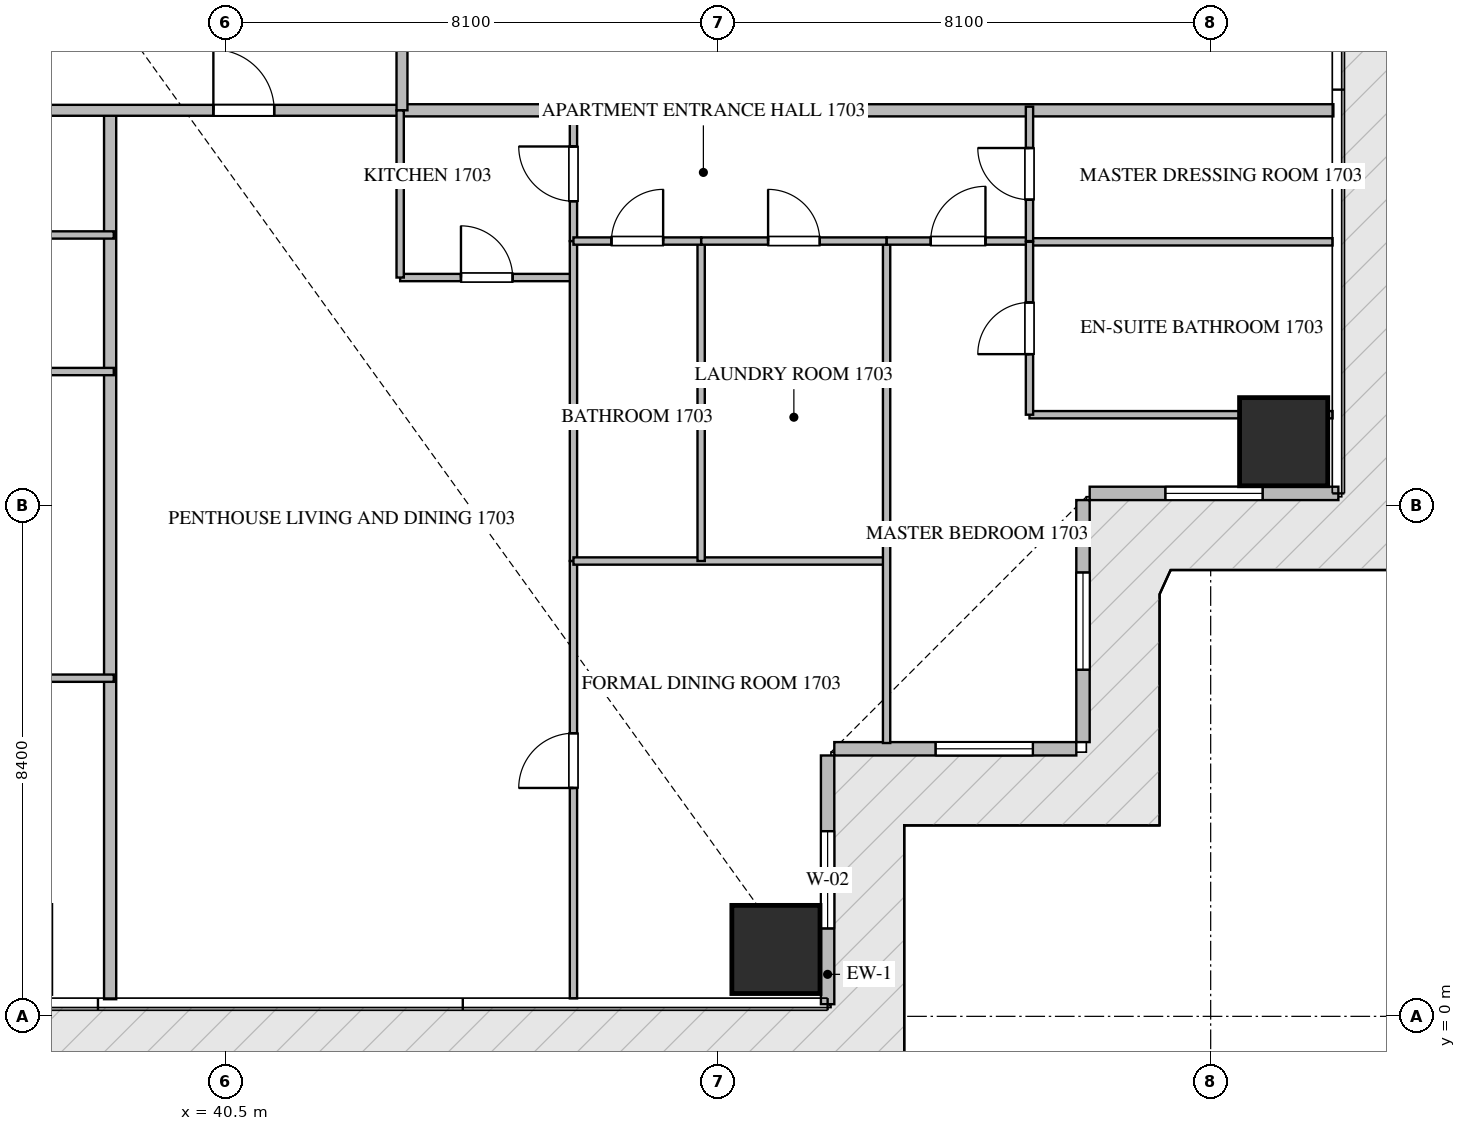
"""IFC4 building model, lengths in metres.
Left out: names, types, materials, properties, quantities, classifications, styles, units other than length and angle.
Written with IfcOpenShell. Run it as: python <this file> out.ifc"""

import sys

from ifc_helpers import new_model, si_unit, direction, frame, frame_2d, origin, origin_2d, place, context, subcontext, project, spatial, rectangle, extrude, source, transform, mapped, element, fill, save


model = new_model("IFC4")
c1 = context("Model", 3, precision=1e-05, world=origin(), true_north=direction((0.0, 1.0)))
c2 = subcontext(c1, "Body", "Model", "MODEL_VIEW")
j1 = project(units=[si_unit("LENGTHUNIT", "METRE"), si_unit("PLANEANGLEUNIT", "RADIAN")], contexts=[c1])
p1 = place(None, origin())
s1 = spatial("IfcSite", under=j1, at=p1, CompositionType="ELEMENT")
p2 = place(p1, origin())
s2 = spatial("IfcBuilding", under=s1, at=p2, CompositionType="ELEMENT")
p3 = place(p2, frame((0.0, 0.0, 71.7)))
s3 = spatial("IfcBuildingStorey", under=s2, at=p3, CompositionType="ELEMENT", Elevation=71.7)
m1 = source(origin(), c2, "Body", "SweptSolid", [
    extrude(rectangle(XDim=1.45, YDim=1.45, at=origin_2d()), origin(), (0.0, 0.0, 1.0), 3.75),
])
for number, where, z_axis, x_axis in (
    (1, (49.55, 1.1, -0.26), (0.0, 0.0, 1.0), (1.0, 0.0, 0.0)),
    (2, (57.9, 9.45, -0.26), (0.0, 0.0, 1.0), (1.0, 0.0, 0.0)),
):
    element("IfcColumn", number, at=place(p3, frame(where, z_axis=z_axis, x_axis=x_axis)), inside=s3, PredefinedType="COLUMN", context=c2, shape_type="MappedRepresentation", body=[
        mapped(m1, transform((0.0, 0.0, 0.0), scale=1.0)),
    ])
p4 = place(p3, frame((50.4, 0.2, 0.0), z_axis=(0.0, 0.0, 1.0), x_axis=(0.0, 1.0, 0.0)))
e3 = element("IfcWall", 3, at=p4, inside=s3, PredefinedType="ELEMENTEDWALL", context=c2, shape_type="SweptSolid", body=[
    extrude(rectangle(XDim=4.09, YDim=0.22, at=frame_2d((2.045, 0.0))), origin(), (0.0, 0.0, 1.0), 3.475),
])
p5 = place(p4, frame((1.245, 0.0, 0.65)))
e4 = element("IfcOpeningElement", 4, at=p5, cuts=e3, PredefinedType="OPENING", context=c2, shape_type="SweptSolid", body=[
    extrude(rectangle(XDim=1.6, YDim=2.1, at=frame_2d((0.8, 1.05))), frame((0.0, 0.12, 0.0), z_axis=(0.0, -1.0, 0.0), x_axis=(1.0, 0.0, 0.0)), (0.0, 0.0, 1.0), 0.24),
])
p6 = place(p3, frame((50.51, 4.4, 0.0), z_axis=(0.0, 0.0, 1.0), x_axis=(1.0, 0.0, 0.0)))
e5 = element("IfcWall", 5, at=p6, inside=s3, PredefinedType="ELEMENTEDWALL", context=c2, shape_type="SweptSolid", body=[
    extrude(rectangle(XDim=3.98, YDim=0.22, at=frame_2d((1.99, 0.0))), origin(), (0.0, 0.0, 1.0), 3.475),
])
p7 = place(p6, frame((1.666, 0.0, 0.65)))
e6 = element("IfcOpeningElement", 6, at=p7, cuts=e5, PredefinedType="OPENING", context=c2, shape_type="SweptSolid", body=[
    extrude(rectangle(XDim=1.6, YDim=2.1, at=frame_2d((0.8, 1.05))), frame((0.0, 0.12, 0.0), z_axis=(0.0, -1.0, 0.0), x_axis=(1.0, 0.0, 0.0)), (0.0, 0.0, 1.0), 0.24),
])
p8 = place(p3, frame((54.6, 4.51, 0.0), z_axis=(0.0, 0.0, 1.0), x_axis=(0.0, 1.0, 0.0)))
e7 = element("IfcWall", 7, at=p8, inside=s3, PredefinedType="ELEMENTEDWALL", context=c2, shape_type="SweptSolid", body=[
    extrude(rectangle(XDim=3.98, YDim=0.22, at=frame_2d((1.99, 0.0))), origin(), (0.0, 0.0, 1.0), 3.475),
])
p9 = place(p8, frame((1.19, 0.0, 0.65)))
e8 = element("IfcOpeningElement", 8, at=p9, cuts=e7, PredefinedType="OPENING", context=c2, shape_type="SweptSolid", body=[
    extrude(rectangle(XDim=1.6, YDim=2.1, at=frame_2d((0.8, 1.05))), frame((0.0, 0.12, 0.0), z_axis=(0.0, -1.0, 0.0), x_axis=(1.0, 0.0, 0.0)), (0.0, 0.0, 1.0), 0.24),
])
p10 = place(p3, frame((54.71, 8.6, 0.0), z_axis=(0.0, 0.0, 1.0), x_axis=(1.0, 0.0, 0.0)))
e9 = element("IfcWall", 9, at=p10, inside=s3, PredefinedType="ELEMENTEDWALL", context=c2, shape_type="SweptSolid", body=[
    extrude(rectangle(XDim=4.09, YDim=0.22, at=frame_2d((2.045, 0.0))), origin(), (0.0, 0.0, 1.0), 3.475),
])
p11 = place(p10, frame((1.245, 0.0, 0.65)))
e10 = element("IfcOpeningElement", 10, at=p11, cuts=e9, PredefinedType="OPENING", context=c2, shape_type="SweptSolid", body=[
    extrude(rectangle(XDim=1.6, YDim=2.1, at=frame_2d((0.8, 1.05))), frame((0.0, 0.12, 0.0), z_axis=(0.0, -1.0, 0.0), x_axis=(1.0, 0.0, 0.0)), (0.0, 0.0, 1.0), 0.24),
])
p12 = place(p3, frame((38.6, 0.282, 0.0), z_axis=(0.0, 0.0, 1.0), x_axis=(0.0, 1.0, 0.0)))
e11 = element("IfcWall", 11, at=p12, inside=s3, PredefinedType="PARTITIONING", context=c2, shape_type="SweptSolid", body=[
    extrude(rectangle(XDim=14.618, YDim=0.2, at=frame_2d((7.309, 0.0))), origin(), (0.0, 0.0, 1.0), 3.49),
])
p13 = place(p3, frame((43.4, 14.9, 0.0), z_axis=(0.0, 0.0, 1.0), x_axis=(1.0, 0.0, 0.0)))
e12 = element("IfcWall", 12, at=p13, inside=s3, PredefinedType="PARTITIONING", context=c2, shape_type="SweptSolid", body=[
    extrude(rectangle(XDim=15.318, YDim=0.2, at=frame_2d((7.659, 0.0))), origin(), (0.0, 0.0, 1.0), 3.49),
])
p14 = place(p3, frame((21.402, 14.9, 0.0), z_axis=(0.0, 0.0, 1.0), x_axis=(1.0, 0.0, 0.0)))
e13 = element("IfcWall", 13, at=p14, inside=s3, PredefinedType="PARTITIONING", context=c2, shape_type="SweptSolid", body=[
    extrude(rectangle(XDim=21.996, YDim=0.18, at=frame_2d((10.998, 0.0))), origin(), (0.0, 0.0, 1.0), 3.49),
])
p15 = place(p14, frame((2.1, 0.0, 0.0)))
e14 = element("IfcOpeningElement", 14, at=p15, cuts=e13, PredefinedType="OPENING", context=c2, shape_type="SweptSolid", body=[
    extrude(rectangle(XDim=1.0, YDim=2.15, at=frame_2d((0.5, 1.075))), frame((0.0, 0.1, 0.0), z_axis=(0.0, -1.0, 0.0), x_axis=(1.0, 0.0, 0.0)), (0.0, 0.0, 1.0), 0.2),
])
p16 = place(p14, frame((6.173, 0.0, 0.0)))
e15 = element("IfcOpeningElement", 15, at=p16, cuts=e13, PredefinedType="OPENING", context=c2, shape_type="SweptSolid", body=[
    extrude(rectangle(XDim=1.0, YDim=2.15, at=frame_2d((0.5, 1.075))), frame((0.0, 0.1, 0.0), z_axis=(0.0, -1.0, 0.0), x_axis=(1.0, 0.0, 0.0)), (0.0, 0.0, 1.0), 0.2),
])
p17 = place(p14, frame((18.896, 0.0, 0.0)))
e16 = element("IfcOpeningElement", 16, at=p17, cuts=e13, PredefinedType="OPENING", context=c2, shape_type="SweptSolid", body=[
    extrude(rectangle(XDim=1.0, YDim=2.15, at=frame_2d((0.5, 1.075))), frame((0.0, 0.1, 0.0), z_axis=(0.0, -1.0, 0.0), x_axis=(1.0, 0.0, 0.0)), (0.0, 0.0, 1.0), 0.2),
])
p18 = place(p3, frame((43.4, 14.9, 0.0), z_axis=(0.0, 0.0, 1.0), x_axis=(0.0, 1.0, 0.0)))
e17 = element("IfcWall", 17, at=p18, inside=s3, PredefinedType="PARTITIONING", context=c2, shape_type="SweptSolid", body=[
    extrude(rectangle(XDim=20.6, YDim=0.18, at=frame_2d((10.3, 0.0))), origin(), (0.0, 0.0, 1.0), 3.49),
])
p19 = place(p18, frame((1.96, 0.0, 0.0)))
e18 = element("IfcOpeningElement", 18, at=p19, cuts=e17, PredefinedType="OPENING", context=c2, shape_type="SweptSolid", body=[
    extrude(rectangle(XDim=1.0, YDim=2.15, at=frame_2d((0.5, 1.075))), frame((0.0, 0.1, 0.0), z_axis=(0.0, -1.0, 0.0), x_axis=(1.0, 0.0, 0.0)), (0.0, 0.0, 1.0), 0.2),
])
for number, where, z_axis, x_axis in (
    (19, (30.54, 5.561, 0.0), (0.0, 0.0, 1.0), (1.0, 0.0, 0.0)),
    (20, (30.54, 10.604, 0.0), (0.0, 0.0, 1.0), (1.0, 0.0, 0.0)),
    (21, (30.54, 12.85, 0.0), (0.0, 0.0, 1.0), (1.0, 0.0, 0.0)),
):
    element("IfcWall", number, at=place(p3, frame(where, z_axis=z_axis, x_axis=x_axis)), inside=s3, PredefinedType="PARTITIONING", context=c2, shape_type="SweptSolid", body=[
        extrude(rectangle(XDim=8.12, YDim=0.12, at=frame_2d((4.06, 0.0))), origin(), (0.0, 0.0, 1.0), 3.49),
    ])
p20 = place(p3, frame((43.37, 12.15, 0.0), z_axis=(0.0, 0.0, 1.0), x_axis=(1.0, 0.0, 0.0)))
e22 = element("IfcWall", 22, at=p20, inside=s3, PredefinedType="PARTITIONING", context=c2, shape_type="SweptSolid", body=[
    extrude(rectangle(XDim=2.85, YDim=0.12, at=frame_2d((1.425, 0.0))), origin(), (0.0, 0.0, 1.0), 3.49),
])
p21 = place(p20, frame((1.0, 0.0, 0.0)))
e23 = element("IfcOpeningElement", 23, at=p21, cuts=e22, PredefinedType="OPENING", context=c2, shape_type="SweptSolid", body=[
    extrude(rectangle(XDim=0.85, YDim=2.1, at=frame_2d((0.425, 1.05))), frame((0.0, 0.07, 0.0), z_axis=(0.0, -1.0, 0.0), x_axis=(1.0, 0.0, 0.0)), (0.0, 0.0, 1.0), 0.14),
])
p22 = place(p3, frame((43.37, 12.15, 0.0), z_axis=(0.0, 0.0, 1.0), x_axis=(0.0, 1.0, 0.0)))
e24 = element("IfcWall", 24, at=p22, inside=s3, PredefinedType="PARTITIONING", context=c2, shape_type="SweptSolid", body=[
    extrude(rectangle(XDim=2.748, YDim=0.12, at=frame_2d((1.374, 0.0))), origin(), (0.0, 0.0, 1.0), 3.49),
])
p23 = place(p3, frame((46.22, 12.75, 0.0), z_axis=(0.0, 0.0, 1.0), x_axis=(0.0, 1.0, 0.0)))
e25 = element("IfcWall", 25, at=p23, inside=s3, PredefinedType="PARTITIONING", context=c2, shape_type="SweptSolid", body=[
    extrude(rectangle(XDim=2.21, YDim=0.12, at=frame_2d((1.105, 0.0))), origin(), (0.0, 0.0, 1.0), 3.49),
])
p24 = place(p23, frame((0.655, 0.0, 0.0)))
e26 = element("IfcOpeningElement", 26, at=p24, cuts=e25, PredefinedType="OPENING", context=c2, shape_type="SweptSolid", body=[
    extrude(rectangle(XDim=0.9, YDim=2.1, at=frame_2d((0.45, 1.05))), frame((0.0, 0.07, 0.0), z_axis=(0.0, -1.0, 0.0), x_axis=(1.0, 0.0, 0.0)), (0.0, 0.0, 1.0), 0.14),
])
p25 = place(p3, frame((46.22, 0.295, 0.0), z_axis=(0.0, 0.0, 1.0), x_axis=(0.0, 1.0, 0.0)))
e27 = element("IfcWall", 27, at=p25, inside=s3, PredefinedType="PARTITIONING", context=c2, shape_type="SweptSolid", body=[
    extrude(rectangle(XDim=7.193, YDim=0.12, at=frame_2d((3.597, 0.0))), origin(), (0.0, 0.0, 1.0), 3.49),
])
p26 = place(p25, frame((3.461, 0.0, 0.0)))
e28 = element("IfcOpeningElement", 28, at=p26, cuts=e27, PredefinedType="OPENING", context=c2, shape_type="SweptSolid", body=[
    extrude(rectangle(XDim=0.9, YDim=2.1, at=frame_2d((0.45, 1.05))), frame((0.0, 0.07, 0.0), z_axis=(0.0, -1.0, 0.0), x_axis=(1.0, 0.0, 0.0)), (0.0, 0.0, 1.0), 0.14),
])
p27 = place(p3, frame((46.22, 7.49, 0.0), z_axis=(0.0, 0.0, 1.0), x_axis=(0.0, 1.0, 0.0)))
e29 = element("IfcWall", 29, at=p27, inside=s3, PredefinedType="PARTITIONING", context=c2, shape_type="SweptSolid", body=[
    extrude(rectangle(XDim=5.258, YDim=0.12, at=frame_2d((2.629, 0.0))), origin(), (0.0, 0.0, 1.0), 3.49),
])
p28 = place(p3, frame((46.22, 7.488, 0.0), z_axis=(0.0, 0.0, 1.0), x_axis=(1.0, 0.0, 0.0)))
e30 = element("IfcWall", 30, at=p28, inside=s3, PredefinedType="PARTITIONING", context=c2, shape_type="SweptSolid", body=[
    extrude(rectangle(XDim=5.15, YDim=0.12, at=frame_2d((2.575, 0.0))), origin(), (0.0, 0.0, 1.0), 3.49),
])
p29 = place(p3, frame((51.37, 4.495, 0.0), z_axis=(0.0, 0.0, 1.0), x_axis=(0.0, 1.0, 0.0)))
e31 = element("IfcWall", 31, at=p29, inside=s3, PredefinedType="PARTITIONING", context=c2, shape_type="SweptSolid", body=[
    extrude(rectangle(XDim=8.255, YDim=0.12, at=frame_2d((4.127, 0.0))), origin(), (0.0, 0.0, 1.0), 3.49),
])
p30 = place(p3, frame((48.32, 7.488, 0.0), z_axis=(0.0, 0.0, 1.0), x_axis=(0.0, 1.0, 0.0)))
e32 = element("IfcWall", 32, at=p30, inside=s3, PredefinedType="PARTITIONING", context=c2, shape_type="SweptSolid", body=[
    extrude(rectangle(XDim=5.262, YDim=0.12, at=frame_2d((2.631, 0.0))), origin(), (0.0, 0.0, 1.0), 3.49),
])
p31 = place(p3, frame((46.22, 12.75, 0.0), z_axis=(0.0, 0.0, 1.0), x_axis=(1.0, 0.0, 0.0)))
e33 = element("IfcWall", 33, at=p31, inside=s3, PredefinedType="PARTITIONING", context=c2, shape_type="SweptSolid", body=[
    extrude(rectangle(XDim=2.1, YDim=0.12, at=frame_2d((1.05, 0.0))), origin(), (0.0, 0.0, 1.0), 3.49),
])
p32 = place(p31, frame((0.625, 0.0, 0.0)))
e34 = element("IfcOpeningElement", 34, at=p32, cuts=e33, PredefinedType="OPENING", context=c2, shape_type="SweptSolid", body=[
    extrude(rectangle(XDim=0.85, YDim=2.1, at=frame_2d((0.425, 1.05))), frame((0.0, 0.07, 0.0), z_axis=(0.0, -1.0, 0.0), x_axis=(1.0, 0.0, 0.0)), (0.0, 0.0, 1.0), 0.14),
])
p33 = place(p3, frame((48.322, 12.75, 0.0), z_axis=(0.0, 0.0, 1.0), x_axis=(1.0, 0.0, 0.0)))
e35 = element("IfcWall", 35, at=p33, inside=s3, PredefinedType="PARTITIONING", context=c2, shape_type="SweptSolid", body=[
    extrude(rectangle(XDim=3.048, YDim=0.12, at=frame_2d((1.524, 0.0))), origin(), (0.0, 0.0, 1.0), 3.49),
])
p34 = place(p33, frame((1.099, 0.0, 0.0)))
e36 = element("IfcOpeningElement", 36, at=p34, cuts=e35, PredefinedType="OPENING", context=c2, shape_type="SweptSolid", body=[
    extrude(rectangle(XDim=0.85, YDim=2.1, at=frame_2d((0.425, 1.05))), frame((0.0, 0.07, 0.0), z_axis=(0.0, -1.0, 0.0), x_axis=(1.0, 0.0, 0.0)), (0.0, 0.0, 1.0), 0.14),
])
p35 = place(p3, frame((51.372, 12.75, 0.0), z_axis=(0.0, 0.0, 1.0), x_axis=(1.0, 0.0, 0.0)))
e37 = element("IfcWall", 37, at=p35, inside=s3, PredefinedType="PARTITIONING", context=c2, shape_type="SweptSolid", body=[
    extrude(rectangle(XDim=2.348, YDim=0.12, at=frame_2d((1.174, 0.0))), origin(), (0.0, 0.0, 1.0), 3.49),
])
p36 = place(p35, frame((0.724, 0.0, 0.0)))
e38 = element("IfcOpeningElement", 38, at=p36, cuts=e37, PredefinedType="OPENING", context=c2, shape_type="SweptSolid", body=[
    extrude(rectangle(XDim=0.9, YDim=2.1, at=frame_2d((0.45, 1.05))), frame((0.0, 0.07, 0.0), z_axis=(0.0, -1.0, 0.0), x_axis=(1.0, 0.0, 0.0)), (0.0, 0.0, 1.0), 0.14),
])
p37 = place(p3, frame((53.72, 9.894, 0.0), z_axis=(0.0, 0.0, 1.0), x_axis=(1.0, 0.0, 0.0)))
e39 = element("IfcWall", 39, at=p37, inside=s3, PredefinedType="PARTITIONING", context=c2, shape_type="SweptSolid", body=[
    extrude(rectangle(XDim=4.985, YDim=0.12, at=frame_2d((2.493, 0.0))), origin(), (0.0, 0.0, 1.0), 3.49),
])
p38 = place(p3, frame((53.722, 12.737, 0.0), z_axis=(0.0, 0.0, 1.0), x_axis=(1.0, 0.0, 0.0)))
e40 = element("IfcWall", 40, at=p38, inside=s3, PredefinedType="PARTITIONING", context=c2, shape_type="SweptSolid", body=[
    extrude(rectangle(XDim=4.983, YDim=0.12, at=frame_2d((2.492, 0.0))), origin(), (0.0, 0.0, 1.0), 3.49),
])
p39 = place(p3, frame((53.72, 9.894, 0.0), z_axis=(0.0, 0.0, 1.0), x_axis=(0.0, 1.0, 0.0)))
e41 = element("IfcWall", 41, at=p39, inside=s3, PredefinedType="PARTITIONING", context=c2, shape_type="SweptSolid", body=[
    extrude(rectangle(XDim=2.843, YDim=0.12, at=frame_2d((1.421, 0.0))), origin(), (0.0, 0.0, 1.0), 3.49),
])
p40 = place(p39, frame((0.996, 0.0, 0.0)))
e42 = element("IfcOpeningElement", 42, at=p40, cuts=e41, PredefinedType="OPENING", context=c2, shape_type="SweptSolid", body=[
    extrude(rectangle(XDim=0.85, YDim=2.1, at=frame_2d((0.425, 1.05))), frame((0.0, 0.07, 0.0), z_axis=(0.0, -1.0, 0.0), x_axis=(1.0, 0.0, 0.0)), (0.0, 0.0, 1.0), 0.14),
])
p41 = place(p3, frame((53.72, 12.75, 0.0), z_axis=(0.0, 0.0, 1.0), x_axis=(0.0, 1.0, 0.0)))
e43 = element("IfcWall", 43, at=p41, inside=s3, PredefinedType="PARTITIONING", context=c2, shape_type="SweptSolid", body=[
    extrude(rectangle(XDim=2.21, YDim=0.12, at=frame_2d((1.105, 0.0))), origin(), (0.0, 0.0, 1.0), 3.49),
])
p42 = place(p41, frame((0.68, 0.0, 0.0)))
e44 = element("IfcOpeningElement", 44, at=p42, cuts=e43, PredefinedType="OPENING", context=c2, shape_type="SweptSolid", body=[
    extrude(rectangle(XDim=0.85, YDim=2.1, at=frame_2d((0.425, 1.05))), frame((0.0, 0.07, 0.0), z_axis=(0.0, -1.0, 0.0), x_axis=(1.0, 0.0, 0.0)), (0.0, 0.0, 1.0), 0.14),
])
m2 = source(origin(), c2, "Body", "SweptSolid", [
    extrude(rectangle(XDim=1.6, YDim=2.1, at=frame_2d((0.8, 1.05))), frame((0.0, 0.03, 0.0), z_axis=(0.0, -1.0, 0.0), x_axis=(1.0, 0.0, 0.0)), (0.0, 0.0, 1.0), 0.06),
])
p43 = place(p5, origin())
e45 = element("IfcWindow", 45, at=p43, inside=s3, PartitioningType="SINGLE_PANEL", PredefinedType="WINDOW", context=c2, shape_type="MappedRepresentation", body=[
    mapped(m2, transform((0.0, 0.0, 0.0), scale=1.0)),
])
fill(e4, e45)
p44 = place(p7, origin())
e46 = element("IfcWindow", 46, at=p44, inside=s3, PartitioningType="SINGLE_PANEL", PredefinedType="WINDOW", context=c2, shape_type="MappedRepresentation", body=[
    mapped(m2, transform((0.0, 0.0, 0.0), scale=1.0)),
])
fill(e6, e46)
p45 = place(p9, origin())
e47 = element("IfcWindow", 47, at=p45, inside=s3, PartitioningType="SINGLE_PANEL", PredefinedType="WINDOW", context=c2, shape_type="MappedRepresentation", body=[
    mapped(m2, transform((0.0, 0.0, 0.0), scale=1.0)),
])
fill(e8, e47)
p46 = place(p11, origin())
e48 = element("IfcWindow", 48, at=p46, inside=s3, PartitioningType="SINGLE_PANEL", PredefinedType="WINDOW", context=c2, shape_type="MappedRepresentation", body=[
    mapped(m2, transform((0.0, 0.0, 0.0), scale=1.0)),
])
fill(e10, e48)
m3 = source(origin(), c2, "Body", "SweptSolid", [
    extrude(rectangle(XDim=1.0, YDim=2.15, at=frame_2d((0.5, 1.075))), frame((0.0, 0.025, 0.0), z_axis=(0.0, -1.0, 0.0), x_axis=(1.0, 0.0, 0.0)), (0.0, 0.0, 1.0), 0.05),
])
p47 = place(p17, origin())
e49 = element("IfcDoor", 49, at=p47, inside=s3, OperationType="SINGLE_SWING_LEFT", PredefinedType="DOOR", context=c2, shape_type="MappedRepresentation", body=[
    mapped(m3, transform((0.0, 0.0, 0.0), scale=1.0)),
])
fill(e16, e49)
m4 = source(origin(), c2, "Body", "SweptSolid", [
    extrude(rectangle(XDim=0.85, YDim=2.1, at=frame_2d((0.425, 1.05))), frame((0.0, 0.025, 0.0), z_axis=(0.0, -1.0, 0.0), x_axis=(1.0, 0.0, 0.0)), (0.0, 0.0, 1.0), 0.05),
])
p48 = place(p21, origin())
e50 = element("IfcDoor", 50, at=p48, inside=s3, OperationType="SINGLE_SWING_LEFT", PredefinedType="DOOR", context=c2, shape_type="MappedRepresentation", body=[
    mapped(m4, transform((0.0, 0.0, 0.0), scale=1.0)),
])
fill(e23, e50)
m5 = source(origin(), c2, "Body", "SweptSolid", [
    extrude(rectangle(XDim=0.9, YDim=2.1, at=frame_2d((0.45, 1.05))), frame((0.0, 0.025, 0.0), z_axis=(0.0, -1.0, 0.0), x_axis=(1.0, 0.0, 0.0)), (0.0, 0.0, 1.0), 0.05),
])
p49 = place(p24, origin())
e51 = element("IfcDoor", 51, at=p49, inside=s3, OperationType="SINGLE_SWING_RIGHT", PredefinedType="DOOR", context=c2, shape_type="MappedRepresentation", body=[
    mapped(m5, transform((0.0, 0.0, 0.0), scale=1.0)),
])
fill(e26, e51)
p50 = place(p26, origin())
e52 = element("IfcDoor", 52, at=p50, inside=s3, OperationType="SINGLE_SWING_LEFT", PredefinedType="DOOR", context=c2, shape_type="MappedRepresentation", body=[
    mapped(m5, transform((0.0, 0.0, 0.0), scale=1.0)),
])
fill(e28, e52)
p51 = place(p32, origin())
e53 = element("IfcDoor", 53, at=p51, inside=s3, OperationType="SINGLE_SWING_RIGHT", PredefinedType="DOOR", context=c2, shape_type="MappedRepresentation", body=[
    mapped(m4, transform((0.0, 0.0, 0.0), scale=1.0)),
])
fill(e34, e53)
p52 = place(p34, origin())
e54 = element("IfcDoor", 54, at=p52, inside=s3, OperationType="SINGLE_SWING_LEFT", PredefinedType="DOOR", context=c2, shape_type="MappedRepresentation", body=[
    mapped(m4, transform((0.0, 0.0, 0.0), scale=1.0)),
])
fill(e36, e54)
p53 = place(p36, origin())
e55 = element("IfcDoor", 55, at=p53, inside=s3, OperationType="SINGLE_SWING_RIGHT", PredefinedType="DOOR", context=c2, shape_type="MappedRepresentation", body=[
    mapped(m5, transform((0.0, 0.0, 0.0), scale=1.0)),
])
fill(e38, e55)
p54 = place(p40, origin())
e56 = element("IfcDoor", 56, at=p54, inside=s3, OperationType="SINGLE_SWING_LEFT", PredefinedType="DOOR", context=c2, shape_type="MappedRepresentation", body=[
    mapped(m4, transform((0.0, 0.0, 0.0), scale=1.0)),
])
fill(e42, e56)
p55 = place(p42, origin())
e57 = element("IfcDoor", 57, at=p55, inside=s3, OperationType="SINGLE_SWING_RIGHT", PredefinedType="DOOR", context=c2, shape_type="MappedRepresentation", body=[
    mapped(m4, transform((0.0, 0.0, 0.0), scale=1.0)),
])
fill(e44, e57)
save(model, sys.argv[1])
